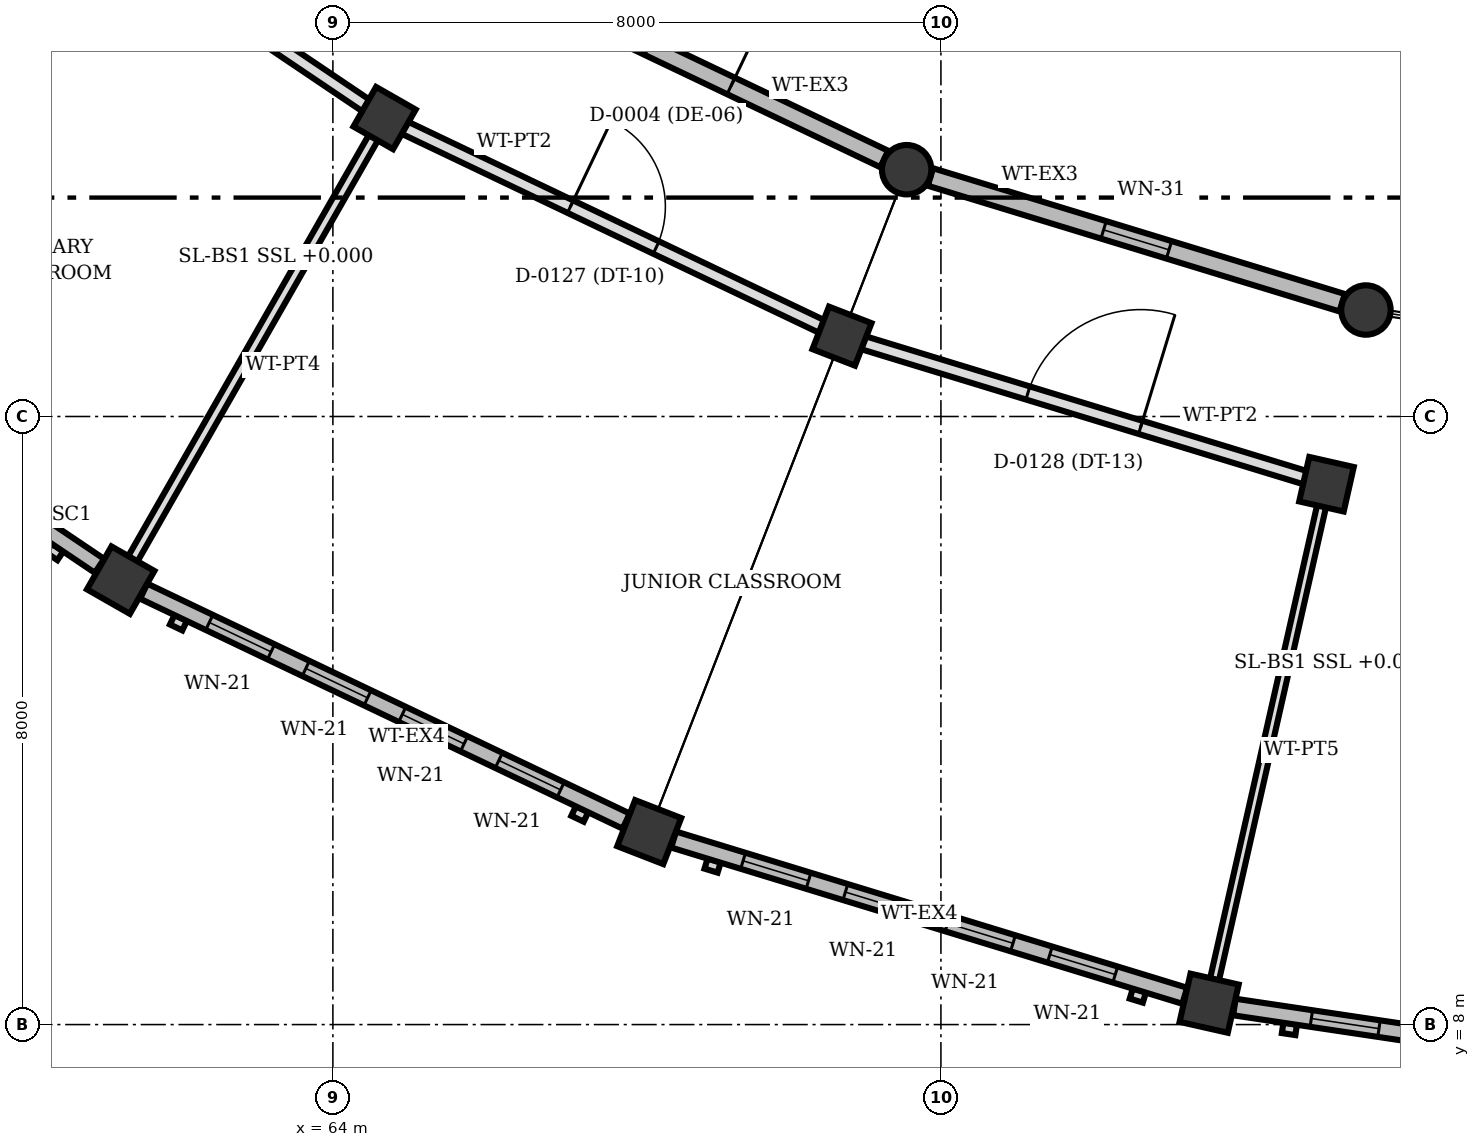
"""IFC4 building model, lengths in metres.
Left out: names, types, materials, properties, quantities, classifications, styles, units other than length and angle.
Written with IfcOpenShell. Run it as: python <this file> out.ifc"""

import sys

from ifc_helpers import new_model, si_unit, direction, frame, frame_2d, origin, origin_2d, place, context, subcontext, project, spatial, rectangle, circle, extrude, element, fill, save


model = new_model("IFC4")
c1 = context("Model", 3, precision=1e-05, world=origin(), true_north=direction((0.0, 1.0)))
c2 = subcontext(c1, "Body", "Model", "MODEL_VIEW")
j1 = project(units=[si_unit("LENGTHUNIT", "METRE"), si_unit("PLANEANGLEUNIT", "RADIAN")], contexts=[c1])
p1 = place(None, origin())
s1 = spatial("IfcSite", under=j1, at=p1, CompositionType="ELEMENT")
p2 = place(p1, origin())
s2 = spatial("IfcBuilding", under=s1, at=p2, CompositionType="ELEMENT")
p3 = place(p2, origin())
s3 = spatial("IfcBuildingStorey", under=s2, at=p3, CompositionType="ELEMENT", Elevation=0.0)
for number, where, z_axis, x_axis in (
    (1, (71.549, 19.247, 0.0), (0.0, 0.0, 1.0), (1.0, 0.0, 0.0)),
    (2, (77.592, 17.401, 0.0), (0.0, 0.0, 1.0), (1.0, 0.0, 0.0)),
):
    element("IfcColumn", number, at=place(p3, frame(where, z_axis=z_axis, x_axis=x_axis)), inside=s3, PredefinedType="COLUMN", context=c2, shape_type="SweptSolid", body=[
        extrude(circle(Radius=0.325, at=origin_2d()), origin(), (0.0, 0.0, 1.0), 4.5),
    ])
for number, where, z_axis, x_axis in (
    (3, (64.68, 19.926, 0.0), (0.0, 0.0, 1.0), (-0.496, -0.868, 0.0)),
    (4, (70.698, 17.057, 0.0), (0.0, 0.0, 1.0), (-0.362, -0.932, 0.0)),
    (5, (77.073, 15.109, 0.0), (0.0, 0.0, 1.0), (-0.221, -0.975, 0.0)),
):
    element("IfcColumn", number, at=place(p3, frame(where, z_axis=z_axis, x_axis=x_axis)), inside=s3, PredefinedType="COLUMN", context=c2, shape_type="SweptSolid", body=[
        extrude(rectangle(XDim=0.6, YDim=0.6, at=origin_2d()), origin(), (0.0, 0.0, 1.0), 4.5),
    ])
for number, where, z_axis, x_axis in (
    (6, (61.208, 13.847, 0.0), (0.0, 0.0, 1.0), (-0.496, -0.868, 0.0)),
    (7, (68.162, 10.532, 0.0), (0.0, 0.0, 1.0), (-0.362, -0.932, 0.0)),
    (8, (75.529, 8.281, 0.0), (0.0, 0.0, 1.0), (-0.221, -0.975, 0.0)),
):
    element("IfcColumn", number, at=place(p3, frame(where, z_axis=z_axis, x_axis=x_axis)), inside=s3, PredefinedType="COLUMN", context=c2, shape_type="SweptSolid", body=[
        extrude(rectangle(XDim=0.65, YDim=0.65, at=origin_2d()), origin(), (0.0, 0.0, 1.0), 4.5),
    ])
p4 = place(p3, frame((60.929, 14.035, 0.0), z_axis=(0.0, 0.0, 1.0), x_axis=(-0.829175809129, 0.558987904659, 0.0)))
e9 = element("IfcWall", 9, at=p4, inside=s3, PredefinedType="SOLIDWALL", context=c2, shape_type="SweptSolid", body=[
    extrude(rectangle(XDim=7.031, YDim=0.22, at=frame_2d((3.515, 0.0))), origin(), (0.0, 0.0, 1.0), 3.55),
])
p5 = place(p4, frame((0.956, 0.0, 0.85)))
e10 = element("IfcOpeningElement", 10, at=p5, cuts=e9, PredefinedType="OPENING", context=c2, shape_type="SweptSolid", body=[
    extrude(rectangle(XDim=0.9, YDim=1.4, at=frame_2d((0.45, 0.7))), frame((0.0, 0.12, 0.0), z_axis=(0.0, -1.0, 0.0), x_axis=(1.0, 0.0, 0.0)), (0.0, 0.0, 1.0), 0.24),
])
p6 = place(p4, frame((2.362, 0.0, 0.85)))
e11 = element("IfcOpeningElement", 11, at=p6, cuts=e9, PredefinedType="OPENING", context=c2, shape_type="SweptSolid", body=[
    extrude(rectangle(XDim=0.9, YDim=1.4, at=frame_2d((0.45, 0.7))), frame((0.0, 0.12, 0.0), z_axis=(0.0, -1.0, 0.0), x_axis=(1.0, 0.0, 0.0)), (0.0, 0.0, 1.0), 0.24),
])
p7 = place(p4, frame((3.769, 0.0, 0.85)))
e12 = element("IfcOpeningElement", 12, at=p7, cuts=e9, PredefinedType="OPENING", context=c2, shape_type="SweptSolid", body=[
    extrude(rectangle(XDim=0.9, YDim=1.4, at=frame_2d((0.45, 0.7))), frame((0.0, 0.12, 0.0), z_axis=(0.0, -1.0, 0.0), x_axis=(1.0, 0.0, 0.0)), (0.0, 0.0, 1.0), 0.24),
])
p8 = place(p4, frame((5.175, 0.0, 0.85)))
e13 = element("IfcOpeningElement", 13, at=p8, cuts=e9, PredefinedType="OPENING", context=c2, shape_type="SweptSolid", body=[
    extrude(rectangle(XDim=0.9, YDim=1.4, at=frame_2d((0.45, 0.7))), frame((0.0, 0.12, 0.0), z_axis=(0.0, -1.0, 0.0), x_axis=(1.0, 0.0, 0.0)), (0.0, 0.0, 1.0), 0.24),
])
p9 = place(p3, frame((67.859, 10.677, 0.0), z_axis=(0.0, 0.0, 1.0), x_axis=(-0.902744968073, 0.43017615301, 0.0)))
e14 = element("IfcWall", 14, at=p9, inside=s3, PredefinedType="SOLIDWALL", context=c2, shape_type="SweptSolid", body=[
    extrude(rectangle(XDim=7.032, YDim=0.22, at=frame_2d((3.516, 0.0))), origin(), (0.0, 0.0, 1.0), 3.55),
])
p10 = place(p9, frame((0.956, 0.0, 0.85)))
e15 = element("IfcOpeningElement", 15, at=p10, cuts=e14, PredefinedType="OPENING", context=c2, shape_type="SweptSolid", body=[
    extrude(rectangle(XDim=0.9, YDim=1.4, at=frame_2d((0.45, 0.7))), frame((0.0, 0.12, 0.0), z_axis=(0.0, -1.0, 0.0), x_axis=(1.0, 0.0, 0.0)), (0.0, 0.0, 1.0), 0.24),
])
p11 = place(p9, frame((2.363, 0.0, 0.85)))
e16 = element("IfcOpeningElement", 16, at=p11, cuts=e14, PredefinedType="OPENING", context=c2, shape_type="SweptSolid", body=[
    extrude(rectangle(XDim=0.9, YDim=1.4, at=frame_2d((0.45, 0.7))), frame((0.0, 0.12, 0.0), z_axis=(0.0, -1.0, 0.0), x_axis=(1.0, 0.0, 0.0)), (0.0, 0.0, 1.0), 0.24),
])
p12 = place(p9, frame((3.769, 0.0, 0.85)))
e17 = element("IfcOpeningElement", 17, at=p12, cuts=e14, PredefinedType="OPENING", context=c2, shape_type="SweptSolid", body=[
    extrude(rectangle(XDim=0.9, YDim=1.4, at=frame_2d((0.45, 0.7))), frame((0.0, 0.12, 0.0), z_axis=(0.0, -1.0, 0.0), x_axis=(1.0, 0.0, 0.0)), (0.0, 0.0, 1.0), 0.24),
])
p13 = place(p9, frame((5.176, 0.0, 0.85)))
e18 = element("IfcOpeningElement", 18, at=p13, cuts=e14, PredefinedType="OPENING", context=c2, shape_type="SweptSolid", body=[
    extrude(rectangle(XDim=0.9, YDim=1.4, at=frame_2d((0.45, 0.7))), frame((0.0, 0.12, 0.0), z_axis=(0.0, -1.0, 0.0), x_axis=(1.0, 0.0, 0.0)), (0.0, 0.0, 1.0), 0.24),
])
p14 = place(p3, frame((66.14, 21.825, 0.0), z_axis=(0.0, 0.0, 1.0), x_axis=(0.902739398982, -0.430187839817, 0.0)))
e19 = element("IfcWall", 19, at=p14, inside=s3, PredefinedType="SOLIDWALL", context=c2, shape_type="SweptSolid", body=[
    extrude(rectangle(XDim=5.665, YDim=0.24, at=frame_2d((2.833, 0.0))), origin(), (0.0, 0.0, 1.0), 3.55),
])
p15 = place(p14, frame((2.232, 0.0, 0.0)))
e20 = element("IfcOpeningElement", 20, at=p15, cuts=e19, PredefinedType="OPENING", context=c2, shape_type="SweptSolid", body=[
    extrude(rectangle(XDim=1.2, YDim=2.25, at=frame_2d((0.6, 1.125))), frame((0.0, 0.13, 0.0), z_axis=(0.0, -1.0, 0.0), x_axis=(1.0, 0.0, 0.0)), (0.0, 0.0, 1.0), 0.26),
])
p16 = place(p3, frame((75.208, 8.379, 0.0), z_axis=(0.0, 0.0, 1.0), x_axis=(-0.956340250866, 0.292255580912, 0.0)))
e21 = element("IfcWall", 21, at=p16, inside=s3, PredefinedType="SOLIDWALL", context=c2, shape_type="SweptSolid", body=[
    extrude(rectangle(XDim=7.032, YDim=0.22, at=frame_2d((3.516, 0.0))), origin(), (0.0, 0.0, 1.0), 3.55),
])
p17 = place(p16, frame((0.956, 0.0, 0.85)))
e22 = element("IfcOpeningElement", 22, at=p17, cuts=e21, PredefinedType="OPENING", context=c2, shape_type="SweptSolid", body=[
    extrude(rectangle(XDim=0.9, YDim=1.4, at=frame_2d((0.45, 0.7))), frame((0.0, 0.12, 0.0), z_axis=(0.0, -1.0, 0.0), x_axis=(1.0, 0.0, 0.0)), (0.0, 0.0, 1.0), 0.24),
])
p18 = place(p16, frame((2.363, 0.0, 0.85)))
e23 = element("IfcOpeningElement", 23, at=p18, cuts=e21, PredefinedType="OPENING", context=c2, shape_type="SweptSolid", body=[
    extrude(rectangle(XDim=0.9, YDim=1.4, at=frame_2d((0.45, 0.7))), frame((0.0, 0.12, 0.0), z_axis=(0.0, -1.0, 0.0), x_axis=(1.0, 0.0, 0.0)), (0.0, 0.0, 1.0), 0.24),
])
p19 = place(p16, frame((3.769, 0.0, 0.85)))
e24 = element("IfcOpeningElement", 24, at=p19, cuts=e21, PredefinedType="OPENING", context=c2, shape_type="SweptSolid", body=[
    extrude(rectangle(XDim=0.9, YDim=1.4, at=frame_2d((0.45, 0.7))), frame((0.0, 0.12, 0.0), z_axis=(0.0, -1.0, 0.0), x_axis=(1.0, 0.0, 0.0)), (0.0, 0.0, 1.0), 0.24),
])
p20 = place(p16, frame((5.176, 0.0, 0.85)))
e25 = element("IfcOpeningElement", 25, at=p20, cuts=e21, PredefinedType="OPENING", context=c2, shape_type="SweptSolid", body=[
    extrude(rectangle(XDim=0.9, YDim=1.4, at=frame_2d((0.45, 0.7))), frame((0.0, 0.12, 0.0), z_axis=(0.0, -1.0, 0.0), x_axis=(1.0, 0.0, 0.0)), (0.0, 0.0, 1.0), 0.24),
])
p21 = place(p3, frame((71.862, 19.151, 0.0), z_axis=(0.0, 0.0, 1.0), x_axis=(0.956419807649, -0.291995122454, 0.0)))
e26 = element("IfcWall", 26, at=p21, inside=s3, PredefinedType="SOLIDWALL", context=c2, shape_type="SweptSolid", body=[
    extrude(rectangle(XDim=5.664, YDim=0.24, at=frame_2d((2.832, 0.0))), origin(), (0.0, 0.0, 1.0), 3.55),
])
p22 = place(p21, frame((2.382, 0.0, 0.9)))
e27 = element("IfcOpeningElement", 27, at=p22, cuts=e26, PredefinedType="OPENING", context=c2, shape_type="SweptSolid", body=[
    extrude(rectangle(XDim=0.9, YDim=1.55, at=frame_2d((0.45, 0.775))), frame((0.0, 0.13, 0.0), z_axis=(0.0, -1.0, 0.0), x_axis=(1.0, 0.0, 0.0)), (0.0, 0.0, 1.0), 0.26),
])
p23 = place(p3, frame((83.148, 7.143, 0.0), z_axis=(0.0, 0.0, 1.0), x_axis=(-0.989038445117, 0.147658234042, 0.0)))
e28 = element("IfcWall", 28, at=p23, inside=s3, PredefinedType="SOLIDWALL", context=c2, shape_type="SweptSolid", body=[
    extrude(rectangle(XDim=7.368, YDim=0.22, at=frame_2d((3.684, 0.0))), origin(), (0.0, 0.0, 1.0), 3.55),
])
p24 = place(p23, frame((1.024, 0.0, 0.85)))
e29 = element("IfcOpeningElement", 29, at=p24, cuts=e28, PredefinedType="OPENING", context=c2, shape_type="SweptSolid", body=[
    extrude(rectangle(XDim=0.9, YDim=1.4, at=frame_2d((0.45, 0.7))), frame((0.0, 0.12, 0.0), z_axis=(0.0, -1.0, 0.0), x_axis=(1.0, 0.0, 0.0)), (0.0, 0.0, 1.0), 0.24),
])
p25 = place(p23, frame((2.497, 0.0, 0.85)))
e30 = element("IfcOpeningElement", 30, at=p25, cuts=e28, PredefinedType="OPENING", context=c2, shape_type="SweptSolid", body=[
    extrude(rectangle(XDim=0.9, YDim=1.4, at=frame_2d((0.45, 0.7))), frame((0.0, 0.12, 0.0), z_axis=(0.0, -1.0, 0.0), x_axis=(1.0, 0.0, 0.0)), (0.0, 0.0, 1.0), 0.24),
])
p26 = place(p23, frame((3.971, 0.0, 0.85)))
e31 = element("IfcOpeningElement", 31, at=p26, cuts=e28, PredefinedType="OPENING", context=c2, shape_type="SweptSolid", body=[
    extrude(rectangle(XDim=0.9, YDim=1.4, at=frame_2d((0.45, 0.7))), frame((0.0, 0.12, 0.0), z_axis=(0.0, -1.0, 0.0), x_axis=(1.0, 0.0, 0.0)), (0.0, 0.0, 1.0), 0.24),
])
p27 = place(p23, frame((5.444, 0.0, 0.85)))
e32 = element("IfcOpeningElement", 32, at=p27, cuts=e28, PredefinedType="OPENING", context=c2, shape_type="SweptSolid", body=[
    extrude(rectangle(XDim=0.9, YDim=1.4, at=frame_2d((0.45, 0.7))), frame((0.0, 0.12, 0.0), z_axis=(0.0, -1.0, 0.0), x_axis=(1.0, 0.0, 0.0)), (0.0, 0.0, 1.0), 0.24),
])
p28 = place(p3, frame((64.535, 19.672, 0.0), z_axis=(0.0, 0.0, 1.0), x_axis=(-0.495957929612, -0.868346550667, 0.0)))
e33 = element("IfcWall", 33, at=p28, inside=s3, PredefinedType="PARTITIONING", context=c2, shape_type="SweptSolid", body=[
    extrude(rectangle(XDim=6.392, YDim=0.14, at=frame_2d((3.196, 0.0))), origin(), (0.0, 0.0, 1.0), 3.572),
])
p29 = place(p3, frame((77.009, 14.824, 0.0), z_axis=(0.0, 0.0, 1.0), x_axis=(-0.220597347052, -0.975364962706, 0.0)))
e34 = element("IfcWall", 34, at=p29, inside=s3, PredefinedType="PARTITIONING", context=c2, shape_type="SweptSolid", body=[
    extrude(rectangle(XDim=6.391, YDim=0.12, at=frame_2d((3.196, 0.0))), origin(), (0.0, 0.0, 1.0), 3.572),
])
p30 = place(p3, frame((59.395, 23.488, 0.0), z_axis=(0.0, 0.0, 1.0), x_axis=(0.829259954876, -0.558863066626, 0.0)))
e35 = element("IfcWall", 35, at=p30, inside=s3, PredefinedType="PARTITIONING", context=c2, shape_type="SweptSolid", body=[
    extrude(rectangle(XDim=6.08, YDim=0.18, at=frame_2d((3.04, 0.0))), origin(), (0.0, 0.0, 1.0), 3.572),
])
p31 = place(p30, frame((2.55, 0.0, 0.0)))
e36 = element("IfcOpeningElement", 36, at=p31, cuts=e35, PredefinedType="OPENING", context=c2, shape_type="SweptSolid", body=[
    extrude(rectangle(XDim=0.98, YDim=2.2, at=frame_2d((0.49, 1.1))), frame((0.0, 0.1, 0.0), z_axis=(0.0, -1.0, 0.0), x_axis=(1.0, 0.0, 0.0)), (0.0, 0.0, 1.0), 0.2),
])
p32 = place(p3, frame((64.944, 19.8, 0.0), z_axis=(0.0, 0.0, 1.0), x_axis=(0.902690527885, -0.430290379704, 0.0)))
e37 = element("IfcWall", 37, at=p32, inside=s3, PredefinedType="PARTITIONING", context=c2, shape_type="SweptSolid", body=[
    extrude(rectangle(XDim=6.082, YDim=0.18, at=frame_2d((3.041, 0.0))), origin(), (0.0, 0.0, 1.0), 3.572),
])
p33 = place(p32, frame((2.416, 0.0, 0.0)))
e38 = element("IfcOpeningElement", 38, at=p33, cuts=e37, PredefinedType="OPENING", context=c2, shape_type="SweptSolid", body=[
    extrude(rectangle(XDim=1.25, YDim=2.2, at=frame_2d((0.625, 1.1))), frame((0.0, 0.1, 0.0), z_axis=(0.0, -1.0, 0.0), x_axis=(1.0, 0.0, 0.0)), (0.0, 0.0, 1.0), 0.2),
])
p34 = place(p3, frame((70.978, 16.971, 0.0), z_axis=(0.0, 0.0, 1.0), x_axis=(0.956393330743, -0.292081832556, 0.0)))
e39 = element("IfcWall", 39, at=p34, inside=s3, PredefinedType="PARTITIONING", context=c2, shape_type="SweptSolid", body=[
    extrude(rectangle(XDim=6.08, YDim=0.18, at=frame_2d((3.04, 0.0))), origin(), (0.0, 0.0, 1.0), 3.572),
])
p35 = place(p34, frame((2.265, 0.0, 0.0)))
e40 = element("IfcOpeningElement", 40, at=p35, cuts=e39, PredefinedType="OPENING", context=c2, shape_type="SweptSolid", body=[
    extrude(rectangle(XDim=1.55, YDim=2.2, at=frame_2d((0.775, 1.1))), frame((0.0, 0.1, 0.0), z_axis=(0.0, -1.0, 0.0), x_axis=(1.0, 0.0, 0.0)), (0.0, 0.0, 1.0), 0.2),
])
p36 = place(p10, origin())
e41 = element("IfcWindow", 41, at=p36, inside=s3, PartitioningType="SINGLE_PANEL", PredefinedType="WINDOW", context=c2, shape_type="SweptSolid", body=[
    extrude(rectangle(XDim=0.9, YDim=1.4, at=frame_2d((0.45, 0.7))), frame((0.0, 0.03, 0.0), z_axis=(0.0, -1.0, 0.0), x_axis=(1.0, 0.0, 0.0)), (0.0, 0.0, 1.0), 0.06),
])
fill(e15, e41)
p37 = place(p11, origin())
e42 = element("IfcWindow", 42, at=p37, inside=s3, PartitioningType="SINGLE_PANEL", PredefinedType="WINDOW", context=c2, shape_type="SweptSolid", body=[
    extrude(rectangle(XDim=0.9, YDim=1.4, at=frame_2d((0.45, 0.7))), frame((0.0, 0.03, 0.0), z_axis=(0.0, -1.0, 0.0), x_axis=(1.0, 0.0, 0.0)), (0.0, 0.0, 1.0), 0.06),
])
fill(e16, e42)
p38 = place(p12, origin())
e43 = element("IfcWindow", 43, at=p38, inside=s3, PartitioningType="SINGLE_PANEL", PredefinedType="WINDOW", context=c2, shape_type="SweptSolid", body=[
    extrude(rectangle(XDim=0.9, YDim=1.4, at=frame_2d((0.45, 0.7))), frame((0.0, 0.03, 0.0), z_axis=(0.0, -1.0, 0.0), x_axis=(1.0, 0.0, 0.0)), (0.0, 0.0, 1.0), 0.06),
])
fill(e17, e43)
p39 = place(p13, origin())
e44 = element("IfcWindow", 44, at=p39, inside=s3, PartitioningType="SINGLE_PANEL", PredefinedType="WINDOW", context=c2, shape_type="SweptSolid", body=[
    extrude(rectangle(XDim=0.9, YDim=1.4, at=frame_2d((0.45, 0.7))), frame((0.0, 0.03, 0.0), z_axis=(0.0, -1.0, 0.0), x_axis=(1.0, 0.0, 0.0)), (0.0, 0.0, 1.0), 0.06),
])
fill(e18, e44)
p40 = place(p15, origin())
e45 = element("IfcDoor", 45, at=p40, inside=s3, OperationType="SINGLE_SWING_RIGHT", PredefinedType="DOOR", context=c2, shape_type="SweptSolid", body=[
    extrude(rectangle(XDim=1.2, YDim=2.25, at=frame_2d((0.6, 1.125))), frame((0.0, 0.025, 0.0), z_axis=(0.0, -1.0, 0.0), x_axis=(1.0, 0.0, 0.0)), (0.0, 0.0, 1.0), 0.05),
])
fill(e20, e45)
p41 = place(p17, origin())
e46 = element("IfcWindow", 46, at=p41, inside=s3, PartitioningType="SINGLE_PANEL", PredefinedType="WINDOW", context=c2, shape_type="SweptSolid", body=[
    extrude(rectangle(XDim=0.9, YDim=1.4, at=frame_2d((0.45, 0.7))), frame((0.0, 0.03, 0.0), z_axis=(0.0, -1.0, 0.0), x_axis=(1.0, 0.0, 0.0)), (0.0, 0.0, 1.0), 0.06),
])
fill(e22, e46)
p42 = place(p18, origin())
e47 = element("IfcWindow", 47, at=p42, inside=s3, PartitioningType="SINGLE_PANEL", PredefinedType="WINDOW", context=c2, shape_type="SweptSolid", body=[
    extrude(rectangle(XDim=0.9, YDim=1.4, at=frame_2d((0.45, 0.7))), frame((0.0, 0.03, 0.0), z_axis=(0.0, -1.0, 0.0), x_axis=(1.0, 0.0, 0.0)), (0.0, 0.0, 1.0), 0.06),
])
fill(e23, e47)
p43 = place(p19, origin())
e48 = element("IfcWindow", 48, at=p43, inside=s3, PartitioningType="SINGLE_PANEL", PredefinedType="WINDOW", context=c2, shape_type="SweptSolid", body=[
    extrude(rectangle(XDim=0.9, YDim=1.4, at=frame_2d((0.45, 0.7))), frame((0.0, 0.03, 0.0), z_axis=(0.0, -1.0, 0.0), x_axis=(1.0, 0.0, 0.0)), (0.0, 0.0, 1.0), 0.06),
])
fill(e24, e48)
p44 = place(p20, origin())
e49 = element("IfcWindow", 49, at=p44, inside=s3, PartitioningType="SINGLE_PANEL", PredefinedType="WINDOW", context=c2, shape_type="SweptSolid", body=[
    extrude(rectangle(XDim=0.9, YDim=1.4, at=frame_2d((0.45, 0.7))), frame((0.0, 0.03, 0.0), z_axis=(0.0, -1.0, 0.0), x_axis=(1.0, 0.0, 0.0)), (0.0, 0.0, 1.0), 0.06),
])
fill(e25, e49)
p45 = place(p22, origin())
e50 = element("IfcWindow", 50, at=p45, inside=s3, PartitioningType="SINGLE_PANEL", PredefinedType="WINDOW", context=c2, shape_type="SweptSolid", body=[
    extrude(rectangle(XDim=0.9, YDim=1.55, at=frame_2d((0.45, 0.775))), frame((0.0, 0.03, 0.0), z_axis=(0.0, -1.0, 0.0), x_axis=(1.0, 0.0, 0.0)), (0.0, 0.0, 1.0), 0.06),
])
fill(e27, e50)
p46 = place(p27, origin())
e51 = element("IfcWindow", 51, at=p46, inside=s3, PartitioningType="SINGLE_PANEL", PredefinedType="WINDOW", context=c2, shape_type="SweptSolid", body=[
    extrude(rectangle(XDim=0.9, YDim=1.4, at=frame_2d((0.45, 0.7))), frame((0.0, 0.03, 0.0), z_axis=(0.0, -1.0, 0.0), x_axis=(1.0, 0.0, 0.0)), (0.0, 0.0, 1.0), 0.06),
])
fill(e32, e51)
p47 = place(p33, origin())
e52 = element("IfcDoor", 52, at=p47, inside=s3, OperationType="SINGLE_SWING_LEFT", PredefinedType="DOOR", context=c2, shape_type="SweptSolid", body=[
    extrude(rectangle(XDim=1.25, YDim=2.2, at=frame_2d((0.625, 1.1))), frame((0.0, 0.025, 0.0), z_axis=(0.0, -1.0, 0.0), x_axis=(1.0, 0.0, 0.0)), (0.0, 0.0, 1.0), 0.05),
])
fill(e38, e52)
p48 = place(p35, origin())
e53 = element("IfcDoor", 53, at=p48, inside=s3, OperationType="SINGLE_SWING_RIGHT", PredefinedType="DOOR", context=c2, shape_type="SweptSolid", body=[
    extrude(rectangle(XDim=1.55, YDim=2.2, at=frame_2d((0.775, 1.1))), frame((0.0, 0.025, 0.0), z_axis=(0.0, -1.0, 0.0), x_axis=(1.0, 0.0, 0.0)), (0.0, 0.0, 1.0), 0.05),
])
fill(e40, e53)
save(model, sys.argv[1])
